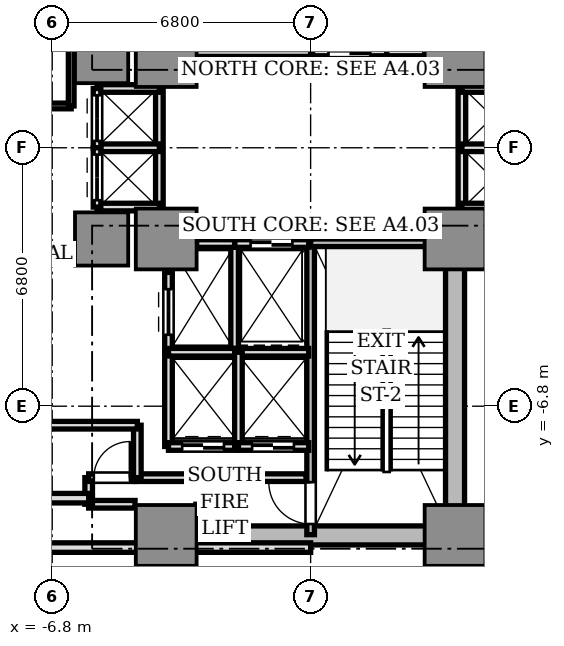
"""IFC4 building model, lengths in metres.
Left out: names, types, materials, properties, quantities, classifications, styles, units other than length and angle.
Written with IfcOpenShell. Run it as: python <this file> out.ifc"""

import sys

from ifc_helpers import new_model, si_unit, direction, frame, frame_2d, origin, origin_2d, place, context, subcontext, project, spatial, rectangle, extrude, source, transform, mapped, element, fill, save


model = new_model("IFC4")
c1 = context("Model", 3, precision=1e-05, world=origin(), true_north=direction((0.0, 1.0)))
c2 = subcontext(c1, "Body", "Model", "MODEL_VIEW")
j1 = project(units=[si_unit("LENGTHUNIT", "METRE"), si_unit("PLANEANGLEUNIT", "RADIAN")], contexts=[c1])
p1 = place(None, origin())
s1 = spatial("IfcSite", under=j1, at=p1, CompositionType="ELEMENT")
p2 = place(p1, origin())
s2 = spatial("IfcBuilding", under=s1, at=p2, CompositionType="ELEMENT")
p3 = place(p2, origin())
s3 = spatial("IfcBuildingStorey", under=s2, at=p3, CompositionType="ELEMENT", Elevation=0.0)
p4 = place(p3, frame((-3.55, -10.2, 0.0), z_axis=(0.0, 0.0, 1.0), x_axis=(1.0, 0.0, 0.0)))
e1 = element("IfcWall", 1, at=p4, inside=s3, PredefinedType="SHEAR", context=c2, shape_type="SweptSolid", body=[
    extrude(rectangle(XDim=7.1, YDim=0.5, at=frame_2d((3.55, 0.0))), origin(), (0.0, 0.0, 1.0), 4.48),
])
p5 = place(p3, frame((3.8, -9.75, 0.0), z_axis=(0.0, 0.0, 1.0), x_axis=(0.0, 1.0, 0.0)))
e2 = element("IfcWall", 2, at=p5, inside=s3, PredefinedType="SHEAR", context=c2, shape_type="SweptSolid", body=[
    extrude(rectangle(XDim=6.9, YDim=0.5, at=frame_2d((3.45, 0.0))), origin(), (0.0, 0.0, 1.0), 4.48),
])
m1 = source(origin(), c2, "Body", "SweptSolid", [
    extrude(rectangle(XDim=1.6, YDim=1.6, at=origin_2d()), origin(), (0.0, 0.0, 1.0), 4.48),
])
for number, where, z_axis, x_axis in (
    (3, (-3.8, 2.4, 0.0), (0.0, 0.0, 1.0), (1.0, 0.0, 0.0)),
    (4, (3.8, 2.4, 0.0), (0.0, 0.0, 1.0), (1.0, 0.0, 0.0)),
    (5, (-3.8, -2.4, 0.0), (0.0, 0.0, 1.0), (1.0, 0.0, 0.0)),
    (6, (3.8, -2.4, 0.0), (0.0, 0.0, 1.0), (1.0, 0.0, 0.0)),
    (7, (-3.8, -10.2, 0.0), (0.0, 0.0, 1.0), (1.0, 0.0, 0.0)),
    (8, (3.8, -10.2, 0.0), (0.0, 0.0, 1.0), (1.0, 0.0, 0.0)),
):
    element("IfcColumn", number, at=place(p3, frame(where, z_axis=z_axis, x_axis=x_axis)), inside=s3, PredefinedType="COLUMN", context=c2, shape_type="MappedRepresentation", body=[
        mapped(m1, transform((0.0, 0.0, 0.0), scale=1.0)),
    ])
m2 = source(origin(), c2, "Body", "SweptSolid", [
    extrude(rectangle(XDim=1.4, YDim=1.4, at=origin_2d()), origin(), (0.0, 0.0, 1.0), 4.48),
])
for number, where, z_axis, x_axis in (
    (9, (-5.5, 2.4, 0.0), (0.0, 0.0, 1.0), (1.0, 0.0, 0.0)),
    (10, (-5.5, -2.4, 0.0), (0.0, 0.0, 1.0), (1.0, 0.0, 0.0)),
):
    element("IfcColumn", number, at=place(p3, frame(where, z_axis=z_axis, x_axis=x_axis)), inside=s3, PredefinedType="COLUMN", context=c2, shape_type="MappedRepresentation", body=[
        mapped(m2, transform((0.0, 0.0, 0.0), scale=1.0)),
    ])
p6 = place(p3, frame((0.0, 2.5, 0.0), z_axis=(0.0, 0.0, 1.0), x_axis=(0.0, 1.0, 0.0)))
e11 = element("IfcWall", 11, at=p6, inside=s3, PredefinedType="SOLIDWALL", context=c2, shape_type="SweptSolid", body=[
    extrude(rectangle(XDim=7.68, YDim=0.2, at=frame_2d((3.84, 0.0))), origin(), (0.0, 0.0, 1.0), 4.48),
])
p7 = place(p6, frame((6.5, 0.0, 0.0)))
e12 = element("IfcOpeningElement", 12, at=p7, cuts=e11, PredefinedType="OPENING", context=c2, shape_type="SweptSolid", body=[
    extrude(rectangle(XDim=0.95, YDim=2.15, at=frame_2d((0.475, 1.075))), frame((0.0, 0.11, 0.0), z_axis=(0.0, -1.0, 0.0), x_axis=(1.0, 0.0, 0.0)), (0.0, 0.0, 1.0), 0.22),
])
p8 = place(p3, frame((-3.72, 2.5, 0.0), z_axis=(0.0, 0.0, 1.0), x_axis=(1.0, 0.0, 0.0)))
e13 = element("IfcWall", 13, at=p8, inside=s3, PredefinedType="SOLIDWALL", context=c2, shape_type="SweptSolid", body=[
    extrude(rectangle(XDim=3.72, YDim=0.2, at=frame_2d((1.86, 0.0))), origin(), (0.0, 0.0, 1.0), 4.48),
])
p9 = place(p3, frame((0.0, -10.18, 0.0), z_axis=(0.0, 0.0, 1.0), x_axis=(0.0, 1.0, 0.0)))
e14 = element("IfcWall", 14, at=p9, inside=s3, PredefinedType="SOLIDWALL", context=c2, shape_type="SweptSolid", body=[
    extrude(rectangle(XDim=7.68, YDim=0.2, at=frame_2d((3.84, 0.0))), origin(), (0.0, 0.0, 1.0), 4.48),
])
p10 = place(p9, frame((0.28, 0.0, 0.0)))
e15 = element("IfcOpeningElement", 15, at=p10, cuts=e14, PredefinedType="OPENING", context=c2, shape_type="SweptSolid", body=[
    extrude(rectangle(XDim=1.1, YDim=2.15, at=frame_2d((0.55, 1.075))), frame((0.0, 0.11, 0.0), z_axis=(0.0, -1.0, 0.0), x_axis=(1.0, 0.0, 0.0)), (0.0, 0.0, 1.0), 0.22),
])
p11 = place(p3, frame((0.0, -2.5, 0.0), z_axis=(0.0, 0.0, 1.0), x_axis=(1.0, 0.0, 0.0)))
e16 = element("IfcWall", 16, at=p11, inside=s3, PredefinedType="SOLIDWALL", context=c2, shape_type="SweptSolid", body=[
    extrude(rectangle(XDim=3.72, YDim=0.2, at=frame_2d((1.86, 0.0))), origin(), (0.0, 0.0, 1.0), 4.48),
])
p12 = place(p3, frame((2.0, 2.5, 0.0), z_axis=(0.0, 0.0, 1.0), x_axis=(0.0, 1.0, 0.0)))
e17 = element("IfcWall", 17, at=p12, inside=s3, PredefinedType="SOLIDWALL", context=c2, shape_type="SweptSolid", body=[
    extrude(rectangle(XDim=2.78, YDim=0.2, at=frame_2d((1.39, 0.0))), origin(), (0.0, 0.0, 1.0), 4.03),
])
p13 = place(p3, frame((0.05, 2.52, 0.0), z_axis=(0.0, 0.0, 1.0), x_axis=(1.0, 0.0, 0.0)))
e18 = element("IfcWall", 18, at=p13, inside=s3, PredefinedType="SOLIDWALL", context=c2, shape_type="SweptSolid", body=[
    extrude(rectangle(XDim=1.95, YDim=0.2, at=frame_2d((0.975, 0.0))), origin(), (0.0, 0.0, 1.0), 4.03),
])
p14 = place(p13, frame((0.42, 0.0, 0.0)))
e19 = element("IfcOpeningElement", 19, at=p14, cuts=e18, PredefinedType="OPENING", context=c2, shape_type="SweptSolid", body=[
    extrude(rectangle(XDim=1.1, YDim=2.2, at=frame_2d((0.55, 1.1))), frame((0.0, 0.11, 0.0), z_axis=(0.0, -1.0, 0.0), x_axis=(1.0, 0.0, 0.0)), (0.0, 0.0, 1.0), 0.22),
])
p15 = place(p3, frame((-2.0, -5.28, 0.0), z_axis=(0.0, 0.0, 1.0), x_axis=(0.0, 1.0, 0.0)))
e20 = element("IfcWall", 20, at=p15, inside=s3, PredefinedType="SOLIDWALL", context=c2, shape_type="SweptSolid", body=[
    extrude(rectangle(XDim=2.78, YDim=0.2, at=frame_2d((1.39, 0.0))), origin(), (0.0, 0.0, 1.0), 4.03),
])
p16 = place(p3, frame((-2.0, -2.52, 0.0), z_axis=(0.0, 0.0, 1.0), x_axis=(1.0, 0.0, 0.0)))
e21 = element("IfcWall", 21, at=p16, inside=s3, PredefinedType="SOLIDWALL", context=c2, shape_type="SweptSolid", body=[
    extrude(rectangle(XDim=1.95, YDim=0.2, at=frame_2d((0.975, 0.0))), origin(), (0.0, 0.0, 1.0), 4.03),
])
p17 = place(p16, frame((0.42, 0.0, 0.0)))
e22 = element("IfcOpeningElement", 22, at=p17, cuts=e21, PredefinedType="OPENING", context=c2, shape_type="SweptSolid", body=[
    extrude(rectangle(XDim=1.1, YDim=2.2, at=frame_2d((0.55, 1.1))), frame((0.0, 0.11, 0.0), z_axis=(0.0, -1.0, 0.0), x_axis=(1.0, 0.0, 0.0)), (0.0, 0.0, 1.0), 0.22),
])
for number, where, z_axis, x_axis in (
    (23, (2.0, 2.52, 0.0), (0.0, 0.0, 1.0), (1.0, 0.0, 0.0)),
    (24, (-3.0, -2.52, 0.0), (0.0, 0.0, 1.0), (1.0, 0.0, 0.0)),
):
    element("IfcWall", number, at=place(p3, frame(where, z_axis=z_axis, x_axis=x_axis)), inside=s3, PredefinedType="SOLIDWALL", context=c2, shape_type="SweptSolid", body=[
        extrude(rectangle(XDim=1.0, YDim=0.2, at=frame_2d((0.5, 0.0))), origin(), (0.0, 0.0, 1.0), 4.03),
    ])
p18 = place(p3, frame((-3.74, -5.36, 0.0), z_axis=(0.0, 0.0, 1.0), x_axis=(0.0, 1.0, 0.0)))
e25 = element("IfcWall", 25, at=p18, inside=s3, PredefinedType="SOLIDWALL", context=c2, shape_type="SweptSolid", body=[
    extrude(rectangle(XDim=2.08, YDim=0.2, at=frame_2d((1.04, 0.0))), origin(), (0.0, 0.0, 1.0), 4.03),
])
p19 = place(p18, frame((0.44, 0.0, 0.0)))
e26 = element("IfcOpeningElement", 26, at=p19, cuts=e25, PredefinedType="OPENING", context=c2, shape_type="SweptSolid", body=[
    extrude(rectangle(XDim=1.2, YDim=2.2, at=frame_2d((0.6, 1.1))), frame((0.0, 0.11, 0.0), z_axis=(0.0, -1.0, 0.0), x_axis=(1.0, 0.0, 0.0)), (0.0, 0.0, 1.0), 0.22),
])
p20 = place(p3, frame((-3.74, -7.86, 0.0), z_axis=(0.0, 0.0, 1.0), x_axis=(0.0, 1.0, 0.0)))
e27 = element("IfcWall", 27, at=p20, inside=s3, PredefinedType="SOLIDWALL", context=c2, shape_type="SweptSolid", body=[
    extrude(rectangle(XDim=2.48, YDim=0.2, at=frame_2d((1.24, 0.0))), origin(), (0.0, 0.0, 1.0), 4.03),
])
p21 = place(p3, frame((-3.74, -7.86, 0.0), z_axis=(0.0, 0.0, 1.0), x_axis=(1.0, 0.0, 0.0)))
e28 = element("IfcWall", 28, at=p21, inside=s3, PredefinedType="SOLIDWALL", context=c2, shape_type="SweptSolid", body=[
    extrude(rectangle(XDim=1.84, YDim=0.2, at=frame_2d((0.92, 0.0))), origin(), (0.0, 0.0, 1.0), 4.03),
])
p22 = place(p21, frame((0.36, 0.0, 0.0)))
e29 = element("IfcOpeningElement", 29, at=p22, cuts=e28, PredefinedType="OPENING", context=c2, shape_type="SweptSolid", body=[
    extrude(rectangle(XDim=1.1, YDim=2.2, at=frame_2d((0.55, 1.1))), frame((0.0, 0.11, 0.0), z_axis=(0.0, -1.0, 0.0), x_axis=(1.0, 0.0, 0.0)), (0.0, 0.0, 1.0), 0.22),
])
p23 = place(p3, frame((-3.74, -5.38, 0.0), z_axis=(0.0, 0.0, 1.0), x_axis=(1.0, 0.0, 0.0)))
e30 = element("IfcWall", 30, at=p23, inside=s3, PredefinedType="SOLIDWALL", context=c2, shape_type="SweptSolid", body=[
    extrude(rectangle(XDim=3.69, YDim=0.2, at=frame_2d((1.845, 0.0))), origin(), (0.0, 0.0, 1.0), 4.03),
])
p24 = place(p3, frame((-1.9, -7.86, 0.0), z_axis=(0.0, 0.0, 1.0), x_axis=(0.0, 1.0, 0.0)))
e31 = element("IfcWall", 31, at=p24, inside=s3, PredefinedType="SOLIDWALL", context=c2, shape_type="SweptSolid", body=[
    extrude(rectangle(XDim=2.48, YDim=0.2, at=frame_2d((1.24, 0.0))), origin(), (0.0, 0.0, 1.0), 4.03),
])
p25 = place(p3, frame((-1.9, -7.86, 0.0), z_axis=(0.0, 0.0, 1.0), x_axis=(1.0, 0.0, 0.0)))
e32 = element("IfcWall", 32, at=p25, inside=s3, PredefinedType="SOLIDWALL", context=c2, shape_type="SweptSolid", body=[
    extrude(rectangle(XDim=1.85, YDim=0.2, at=frame_2d((0.925, 0.0))), origin(), (0.0, 0.0, 1.0), 4.03),
])
p26 = place(p25, frame((0.36, 0.0, 0.0)))
e33 = element("IfcOpeningElement", 33, at=p26, cuts=e32, PredefinedType="OPENING", context=c2, shape_type="SweptSolid", body=[
    extrude(rectangle(XDim=1.1, YDim=2.2, at=frame_2d((0.55, 1.1))), frame((0.0, 0.11, 0.0), z_axis=(0.0, -1.0, 0.0), x_axis=(1.0, 0.0, 0.0)), (0.0, 0.0, 1.0), 0.22),
])
p27 = place(p3, frame((3.98, -1.56, 0.0), z_axis=(0.0, 0.0, 1.0), x_axis=(0.0, 1.0, 0.0)))
e34 = element("IfcWall", 34, at=p27, inside=s3, PredefinedType="SOLIDWALL", context=c2, shape_type="SweptSolid", body=[
    extrude(rectangle(XDim=3.12, YDim=0.2, at=frame_2d((1.56, 0.0))), origin(), (0.0, 0.0, 1.0), 3.55),
])
for number, where, z_axis, x_axis in (
    (35, (3.98, 1.56, 0.0), (0.0, 0.0, 1.0), (1.0, 0.0, 0.0)),
    (36, (3.98, -1.56, 0.0), (0.0, 0.0, 1.0), (1.0, 0.0, 0.0)),
    (37, (3.98, 0.0, 0.0), (0.0, 0.0, 1.0), (1.0, 0.0, 0.0)),
):
    element("IfcWall", number, at=place(p3, frame(where, z_axis=z_axis, x_axis=x_axis)), inside=s3, PredefinedType="SOLIDWALL", context=c2, shape_type="SweptSolid", body=[
        extrude(rectangle(XDim=1.64, YDim=0.2, at=frame_2d((0.82, 0.0))), origin(), (0.0, 0.0, 1.0), 4.03),
    ])
p28 = place(p3, frame((-3.98, -1.56, 0.0), z_axis=(0.0, 0.0, 1.0), x_axis=(0.0, 1.0, 0.0)))
e38 = element("IfcWall", 38, at=p28, inside=s3, PredefinedType="SOLIDWALL", context=c2, shape_type="SweptSolid", body=[
    extrude(rectangle(XDim=3.12, YDim=0.2, at=frame_2d((1.56, 0.0))), origin(), (0.0, 0.0, 1.0), 3.55),
])
for number, where, z_axis, x_axis in (
    (39, (-5.62, 1.56, 0.0), (0.0, 0.0, 1.0), (1.0, 0.0, 0.0)),
    (40, (-5.62, -1.56, 0.0), (0.0, 0.0, 1.0), (1.0, 0.0, 0.0)),
    (41, (-5.62, 0.0, 0.0), (0.0, 0.0, 1.0), (1.0, 0.0, 0.0)),
):
    element("IfcWall", number, at=place(p3, frame(where, z_axis=z_axis, x_axis=x_axis)), inside=s3, PredefinedType="SOLIDWALL", context=c2, shape_type="SweptSolid", body=[
        extrude(rectangle(XDim=1.64, YDim=0.2, at=frame_2d((0.82, 0.0))), origin(), (0.0, 0.0, 1.0), 4.03),
    ])
p29 = place(p3, frame((-5.62, 0.0, 0.0), z_axis=(0.0, 0.0, 1.0), x_axis=(0.0, 1.0, 0.0)))
e42 = element("IfcWall", 42, at=p29, inside=s3, PredefinedType="SOLIDWALL", context=c2, shape_type="SweptSolid", body=[
    extrude(rectangle(XDim=1.56, YDim=0.2, at=frame_2d((0.78, 0.0))), origin(), (0.0, 0.0, 1.0), 4.03),
])
p30 = place(p29, frame((0.18, 0.0, 0.0)))
e43 = element("IfcOpeningElement", 43, at=p30, cuts=e42, PredefinedType="OPENING", context=c2, shape_type="SweptSolid", body=[
    extrude(rectangle(XDim=1.2, YDim=2.2, at=frame_2d((0.6, 1.1))), frame((0.0, 0.11, 0.0), z_axis=(0.0, -1.0, 0.0), x_axis=(1.0, 0.0, 0.0)), (0.0, 0.0, 1.0), 0.22),
])
p31 = place(p3, frame((-5.62, -1.56, 0.0), z_axis=(0.0, 0.0, 1.0), x_axis=(0.0, 1.0, 0.0)))
e44 = element("IfcWall", 44, at=p31, inside=s3, PredefinedType="SOLIDWALL", context=c2, shape_type="SweptSolid", body=[
    extrude(rectangle(XDim=1.56, YDim=0.2, at=frame_2d((0.78, 0.0))), origin(), (0.0, 0.0, 1.0), 4.03),
])
p32 = place(p31, frame((0.18, 0.0, 0.0)))
e45 = element("IfcOpeningElement", 45, at=p32, cuts=e44, PredefinedType="OPENING", context=c2, shape_type="SweptSolid", body=[
    extrude(rectangle(XDim=1.2, YDim=2.2, at=frame_2d((0.6, 1.1))), frame((0.0, 0.11, 0.0), z_axis=(0.0, -1.0, 0.0), x_axis=(1.0, 0.0, 0.0)), (0.0, 0.0, 1.0), 0.22),
])
p33 = place(p3, frame((-13.8, 1.1, 0.0), z_axis=(0.0, 0.0, 1.0), x_axis=(1.0, 0.0, 0.0)))
e46 = element("IfcWall", 46, at=p33, inside=s3, PredefinedType="PARTITIONING", context=c2, shape_type="SweptSolid", body=[
    extrude(rectangle(XDim=7.5, YDim=0.15, at=frame_2d((3.75, 0.0))), origin(), (0.0, 0.0, 1.0), 4.03),
])
p34 = place(p33, frame((2.8, 0.0, 0.0)))
e47 = element("IfcOpeningElement", 47, at=p34, cuts=e46, PredefinedType="OPENING", context=c2, shape_type="SweptSolid", body=[
    extrude(rectangle(XDim=0.95, YDim=2.15, at=frame_2d((0.475, 1.075))), frame((0.0, 0.085, 0.0), z_axis=(0.0, -1.0, 0.0), x_axis=(1.0, 0.0, 0.0)), (0.0, 0.0, 1.0), 0.17),
])
p35 = place(p3, frame((-6.3, 1.1, 0.0), z_axis=(0.0, 0.0, 1.0), x_axis=(0.0, 1.0, 0.0)))
e48 = element("IfcWall", 48, at=p35, inside=s3, PredefinedType="PARTITIONING", context=c2, shape_type="SweptSolid", body=[
    extrude(rectangle(XDim=7.6, YDim=0.15, at=frame_2d((3.8, 0.0))), origin(), (0.0, 0.0, 1.0), 4.03),
])
p36 = place(p3, frame((-4.62, -8.68, 0.0), z_axis=(0.0, 0.0, 1.0), x_axis=(1.0, 0.0, 0.0)))
e49 = element("IfcWall", 49, at=p36, inside=s3, PredefinedType="SOLIDWALL", context=c2, shape_type="SweptSolid", body=[
    extrude(rectangle(XDim=4.5, YDim=0.2, at=frame_2d((2.25, 0.0))), origin(), (0.0, 0.0, 1.0), 4.03),
])
p37 = place(p3, frame((-2.92, -10.02, 0.0), z_axis=(0.0, 0.0, 1.0), x_axis=(0.0, 1.0, 0.0)))
e50 = element("IfcWall", 50, at=p37, inside=s3, PredefinedType="SOLIDWALL", context=c2, shape_type="SweptSolid", body=[
    extrude(rectangle(XDim=0.64, YDim=0.2, at=frame_2d((0.32, 0.0))), origin(), (0.0, 0.0, 1.0), 4.03),
])
p38 = place(p3, frame((-5.84, -9.38, 0.0), z_axis=(0.0, 0.0, 1.0), x_axis=(1.0, 0.0, 0.0)))
e51 = element("IfcWall", 51, at=p38, inside=s3, PredefinedType="SOLIDWALL", context=c2, shape_type="SweptSolid", body=[
    extrude(rectangle(XDim=1.22, YDim=0.2, at=frame_2d((0.61, 0.0))), origin(), (0.0, 0.0, 1.0), 4.03),
])
p39 = place(p3, frame((-5.84, -9.38, 0.0), z_axis=(0.0, 0.0, 1.0), x_axis=(0.0, 1.0, 0.0)))
e52 = element("IfcWall", 52, at=p39, inside=s3, PredefinedType="SOLIDWALL", context=c2, shape_type="SweptSolid", body=[
    extrude(rectangle(XDim=0.7, YDim=0.2, at=frame_2d((0.35, 0.0))), origin(), (0.0, 0.0, 1.0), 4.03),
])
p40 = place(p3, frame((-5.84, -8.68, 0.0), z_axis=(0.0, 0.0, 1.0), x_axis=(1.0, 0.0, 0.0)))
e53 = element("IfcWall", 53, at=p40, inside=s3, PredefinedType="SOLIDWALL", context=c2, shape_type="SweptSolid", body=[
    extrude(rectangle(XDim=1.22, YDim=0.2, at=frame_2d((0.61, 0.0))), origin(), (0.0, 0.0, 1.0), 4.03),
])
p41 = place(p40, frame((0.135, 0.0, 0.0)))
e54 = element("IfcOpeningElement", 54, at=p41, cuts=e53, PredefinedType="OPENING", context=c2, shape_type="SweptSolid", body=[
    extrude(rectangle(XDim=0.95, YDim=2.15, at=frame_2d((0.475, 1.075))), frame((0.0, 0.11, 0.0), z_axis=(0.0, -1.0, 0.0), x_axis=(1.0, 0.0, 0.0)), (0.0, 0.0, 1.0), 0.22),
])
p42 = place(p3, frame((-4.56, -8.68, 0.0), z_axis=(0.0, 0.0, 1.0), x_axis=(0.0, 1.0, 0.0)))
e55 = element("IfcWall", 55, at=p42, inside=s3, PredefinedType="SOLIDWALL", context=c2, shape_type="SweptSolid", body=[
    extrude(rectangle(XDim=1.38, YDim=0.2, at=frame_2d((0.69, 0.0))), origin(), (0.0, 0.0, 1.0), 4.03),
])
p43 = place(p3, frame((-35.68, -7.3, 0.0), z_axis=(0.0, 0.0, 1.0), x_axis=(1.0, 0.0, 0.0)))
e56 = element("IfcWall", 56, at=p43, inside=s3, PredefinedType="SOLIDWALL", context=c2, shape_type="SweptSolid", body=[
    extrude(rectangle(XDim=31.12, YDim=0.2, at=frame_2d((15.56, 0.0))), origin(), (0.0, 0.0, 1.0), 3.95),
])
p44 = place(p43, frame((22.0, 0.0, 0.0)))
e57 = element("IfcOpeningElement", 57, at=p44, cuts=e56, PredefinedType="OPENING", context=c2, shape_type="SweptSolid", body=[
    extrude(rectangle(XDim=1.1, YDim=2.15, at=frame_2d((0.55, 1.075))), frame((0.0, 0.11, 0.0), z_axis=(0.0, -1.0, 0.0), x_axis=(1.0, 0.0, 0.0)), (0.0, 0.0, 1.0), 0.22),
])
p45 = place(p3, frame((-35.68, -9.22, 0.0), z_axis=(0.0, 0.0, 1.0), x_axis=(1.0, 0.0, 0.0)))
e58 = element("IfcWall", 58, at=p45, inside=s3, PredefinedType="SOLIDWALL", context=c2, shape_type="SweptSolid", body=[
    extrude(rectangle(XDim=29.84, YDim=0.25, at=frame_2d((14.92, 0.0))), origin(), (0.0, 0.0, 1.0), 3.95),
])
p46 = place(p3, frame((-16.3, -10.52, 0.0), z_axis=(0.0, 0.0, 1.0), x_axis=(1.0, 0.0, 0.0)))
e59 = element("IfcWall", 59, at=p46, inside=s3, PredefinedType="SOLIDWALL", context=c2, shape_type="SweptSolid", body=[
    extrude(rectangle(XDim=16.3, YDim=0.25, at=frame_2d((8.15, 0.0))), origin(), (0.0, 0.0, 1.0), 4.03),
])
p47 = place(p3, frame((4.0, -10.55, 0.0), z_axis=(0.0, 0.0, 1.0), x_axis=(1.0, 0.0, 0.0)))
e60 = element("IfcWall", 60, at=p47, inside=s3, PredefinedType="SOLIDWALL", context=c2, shape_type="SweptSolid", body=[
    extrude(rectangle(XDim=9.8, YDim=0.25, at=frame_2d((4.9, 0.0))), origin(), (0.0, 0.0, 1.0), 4.03),
])
p48 = place(p47, frame((5.0, 0.0, 0.0)))
e61 = element("IfcOpeningElement", 61, at=p48, cuts=e60, PredefinedType="OPENING", context=c2, shape_type="SweptSolid", body=[
    extrude(rectangle(XDim=1.2, YDim=2.2, at=frame_2d((0.6, 1.1))), frame((0.0, 0.135, 0.0), z_axis=(0.0, -1.0, 0.0), x_axis=(1.0, 0.0, 0.0)), (0.0, 0.0, 1.0), 0.27),
])
m3 = source(origin(), c2, "Body", "SweptSolid", [
    extrude(rectangle(XDim=1.1, YDim=0.05, at=origin_2d()), origin(), (0.0, 0.0, 1.0), 2.2),
])
p49 = place(p14, frame((0.55, 0.0, 0.0)))
e62 = element("IfcDoor", 62, at=p49, inside=s3, OperationType="DOUBLE_DOOR_SLIDING", PredefinedType="DOOR", context=c2, shape_type="MappedRepresentation", body=[
    mapped(m3, transform((0.0, 0.0, 0.0), scale=1.0)),
])
fill(e19, e62)
p50 = place(p17, frame((0.55, 0.0, 0.0)))
e63 = element("IfcDoor", 63, at=p50, inside=s3, OperationType="DOUBLE_DOOR_SLIDING", PredefinedType="DOOR", context=c2, shape_type="MappedRepresentation", body=[
    mapped(m3, transform((0.0, 0.0, 0.0), scale=1.0)),
])
fill(e22, e63)
m4 = source(origin(), c2, "Body", "SweptSolid", [
    extrude(rectangle(XDim=1.2, YDim=0.05, at=origin_2d()), origin(), (0.0, 0.0, 1.0), 2.2),
])
p51 = place(p19, frame((0.6, 0.0, 0.0)))
e64 = element("IfcDoor", 64, at=p51, inside=s3, OperationType="DOUBLE_DOOR_SLIDING", PredefinedType="DOOR", context=c2, shape_type="MappedRepresentation", body=[
    mapped(m4, transform((0.0, 0.0, 0.0), scale=1.0)),
])
fill(e26, e64)
p52 = place(p22, frame((0.55, 0.0, 0.0)))
e65 = element("IfcDoor", 65, at=p52, inside=s3, OperationType="DOUBLE_DOOR_SLIDING", PredefinedType="DOOR", context=c2, shape_type="MappedRepresentation", body=[
    mapped(m3, transform((0.0, 0.0, 0.0), scale=1.0)),
])
fill(e29, e65)
p53 = place(p26, frame((0.55, 0.0, 0.0)))
e66 = element("IfcDoor", 66, at=p53, inside=s3, OperationType="DOUBLE_DOOR_SLIDING", PredefinedType="DOOR", context=c2, shape_type="MappedRepresentation", body=[
    mapped(m3, transform((0.0, 0.0, 0.0), scale=1.0)),
])
fill(e33, e66)
p54 = place(p30, frame((0.6, 0.0, 0.0)))
e67 = element("IfcDoor", 67, at=p54, inside=s3, OperationType="DOUBLE_DOOR_SLIDING", PredefinedType="DOOR", context=c2, shape_type="MappedRepresentation", body=[
    mapped(m4, transform((0.0, 0.0, 0.0), scale=1.0)),
])
fill(e43, e67)
p55 = place(p32, frame((0.6, 0.0, 0.0)))
e68 = element("IfcDoor", 68, at=p55, inside=s3, OperationType="DOUBLE_DOOR_SLIDING", PredefinedType="DOOR", context=c2, shape_type="MappedRepresentation", body=[
    mapped(m4, transform((0.0, 0.0, 0.0), scale=1.0)),
])
fill(e45, e68)
m5 = source(origin(), c2, "Body", "SweptSolid", [
    extrude(rectangle(XDim=1.1, YDim=0.05, at=origin_2d()), origin(), (0.0, 0.0, 1.0), 2.15),
])
p56 = place(p10, frame((0.55, 0.0, 0.0)))
e69 = element("IfcDoor", 69, at=p56, inside=s3, OperationType="SINGLE_SWING_RIGHT", PredefinedType="DOOR", context=c2, shape_type="MappedRepresentation", body=[
    mapped(m5, transform((0.0, 0.0, 0.0), scale=1.0)),
])
fill(e15, e69)
m6 = source(origin(), c2, "Body", "SweptSolid", [
    extrude(rectangle(XDim=0.95, YDim=0.05, at=origin_2d()), origin(), (0.0, 0.0, 1.0), 2.15),
])
p57 = place(p41, frame((0.475, 0.0, 0.0)))
e70 = element("IfcDoor", 70, at=p57, inside=s3, OperationType="SINGLE_SWING_RIGHT", PredefinedType="DOOR", context=c2, shape_type="MappedRepresentation", body=[
    mapped(m6, transform((0.0, 0.0, 0.0), scale=1.0)),
])
fill(e54, e70)
save(model, sys.argv[1])
